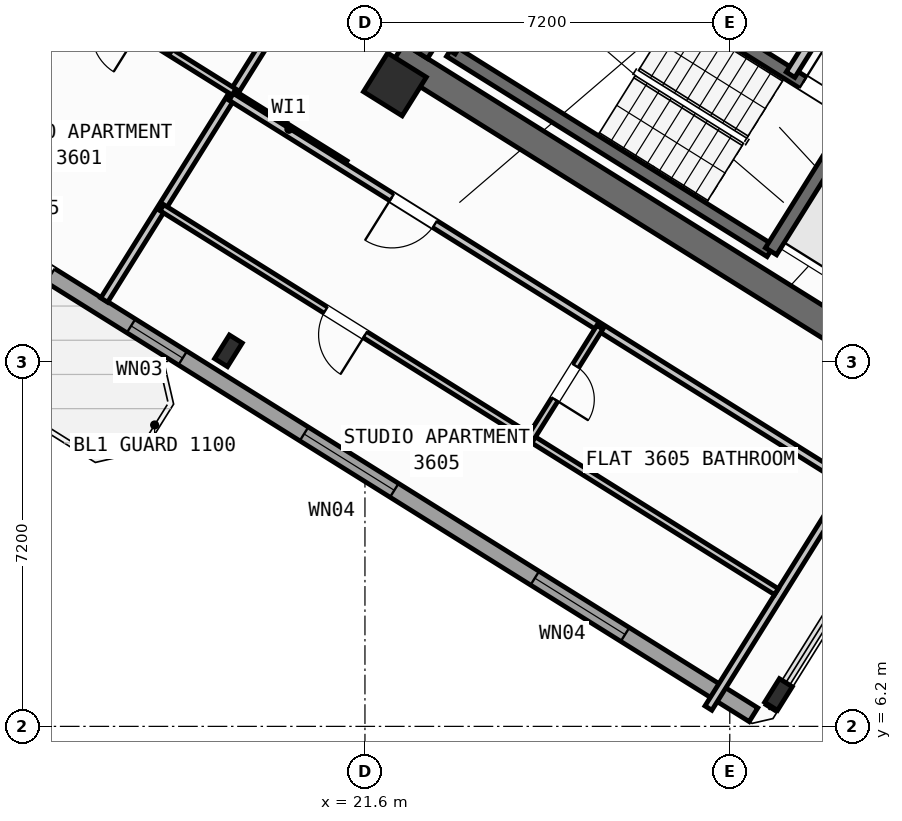
"""IFC4 building model, lengths in metres.
Left out: names, types, materials, properties, quantities, classifications, styles, units other than length and angle.
Written with IfcOpenShell. Run it as: python <this file> out.ifc"""

import sys

from ifc_helpers import new_model, si_unit, direction, frame, frame_2d, origin, origin_2d, place, context, subcontext, project, spatial, rectangle, hollow_rectangle, i_section, extrude, source, transform, mapped, element, fill, save


model = new_model("IFC4")
c1 = context("Model", 3, precision=1e-05, world=origin(), true_north=direction((0.0, 1.0)))
c2 = subcontext(c1, "Body", "Model", "MODEL_VIEW")
j1 = project(units=[si_unit("LENGTHUNIT", "METRE"), si_unit("PLANEANGLEUNIT", "RADIAN")], contexts=[c1])
p1 = place(None, origin())
s1 = spatial("IfcSite", under=j1, at=p1, CompositionType="ELEMENT")
p2 = place(p1, origin())
s2 = spatial("IfcBuilding", under=s1, at=p2, CompositionType="ELEMENT")
p3 = place(p2, frame((0.0, 0.0, 144.3)))
s3 = spatial("IfcBuildingStorey", under=s2, at=p3, CompositionType="ELEMENT", Elevation=144.3)
p4 = place(p3, frame((33.366, 12.477, 0.0), z_axis=(0.0, 0.0, 1.0), x_axis=(-0.848047359947, 0.529920442413, 0.0)))
e1 = element("IfcWall", 1, at=p4, inside=s3, PredefinedType="SHEAR", context=c2, shape_type="SweptSolid", body=[
    extrude(rectangle(XDim=13.14, YDim=0.55, at=frame_2d((6.57, 0.0))), origin(), (0.0, 0.0, 1.0), 3.35),
])
p5 = place(p3, frame((26.007, 24.976, 0.0), z_axis=(0.0, 0.0, 1.0), x_axis=(-0.529923795287, -0.848045264823, 0.0)))
e2 = element("IfcWall", 2, at=p5, inside=s3, PredefinedType="SHEAR", context=c2, shape_type="SweptSolid", body=[
    extrude(rectangle(XDim=6.425, YDim=0.55, at=frame_2d((3.212, 0.0))), origin(), (0.0, 0.0, 1.0), 3.35),
])
m1 = source(origin(), c2, "Body", "SweptSolid", [
    extrude(i_section(OverallWidth=0.3, OverallDepth=0.55, WebThickness=0.015, FlangeThickness=0.029, at=origin_2d()), origin(), (0.0, 0.0, 1.0), 3.6),
])
p6 = place(p3, frame((29.761, 6.829, 0.0), z_axis=(0.0, 0.0, 1.0), x_axis=(-0.848048096156, 0.529919264233, 0.0)))
e3 = element("IfcColumn", 3, at=p6, inside=s3, PredefinedType="COLUMN", context=c2, shape_type="MappedRepresentation", body=[
    mapped(m1, transform((0.0, 0.0, 0.0), scale=1.0)),
])
m2 = source(origin(), c2, "Body", "SweptSolid", [
    extrude(hollow_rectangle(XDim=0.9, YDim=0.9, WallThickness=0.036, at=origin_2d()), origin(), (0.0, 0.0, 1.0), 3.6),
])
p7 = place(p3, frame((22.191, 18.87, 0.0), z_axis=(0.0, 0.0, 1.0), x_axis=(-0.848048096156, 0.529919264233, 0.0)))
e4 = element("IfcColumn", 4, at=p7, inside=s3, PredefinedType="COLUMN", context=c2, shape_type="MappedRepresentation", body=[
    mapped(m2, transform((0.0, 0.0, 0.0), scale=1.0)),
])
p8 = place(p3, frame((18.906, 13.612, 0.0), z_axis=(0.0, 0.0, 1.0), x_axis=(-0.848048096156, 0.529919264233, 0.0)))
e5 = element("IfcColumn", 5, at=p8, inside=s3, PredefinedType="COLUMN", context=c2, shape_type="MappedRepresentation", body=[
    mapped(m1, transform((0.0, 0.0, 0.0), scale=1.0)),
])
p9 = place(p3, frame((29.268, 6.429, 0.0), z_axis=(0.0, 0.0, 1.0), x_axis=(-0.848049971435, 0.529916263149, 0.0)))
e6 = element("IfcWall", 6, at=p9, inside=s3, PredefinedType="STANDARD", context=c2, shape_type="SweptSolid", body=[
    extrude(rectangle(XDim=31.588, YDim=0.32, at=frame_2d((15.794, 0.0))), origin(), (0.0, 0.0, 1.0), 3.35),
])
p10 = place(p9, frame((16.362, 0.0, 0.0)))
e7 = element("IfcOpeningElement", 7, at=p10, cuts=e6, PredefinedType="OPENING", context=c2, shape_type="SweptSolid", body=[
    extrude(rectangle(XDim=1.2, YDim=2.15, at=frame_2d((0.6, 1.075))), frame((0.0, 0.17, 0.0), z_axis=(0.0, -1.0, 0.0), x_axis=(1.0, 0.0, 0.0)), (0.0, 0.0, 1.0), 0.34),
])
p11 = place(p9, frame((2.989, 0.0, 0.8)))
e8 = element("IfcOpeningElement", 8, at=p11, cuts=e6, PredefinedType="OPENING", context=c2, shape_type="SweptSolid", body=[
    extrude(rectangle(XDim=2.1, YDim=1.55, at=frame_2d((1.05, 0.775))), frame((0.0, 0.17, 0.0), z_axis=(0.0, -1.0, 0.0), x_axis=(1.0, 0.0, 0.0)), (0.0, 0.0, 1.0), 0.34),
])
p12 = place(p9, frame((8.359, 0.0, 0.8)))
e9 = element("IfcOpeningElement", 9, at=p12, cuts=e6, PredefinedType="OPENING", context=c2, shape_type="SweptSolid", body=[
    extrude(rectangle(XDim=2.1, YDim=1.55, at=frame_2d((1.05, 0.775))), frame((0.0, 0.17, 0.0), z_axis=(0.0, -1.0, 0.0), x_axis=(1.0, 0.0, 0.0)), (0.0, 0.0, 1.0), 0.34),
])
p13 = place(p9, frame((13.284, 0.0, 0.95)))
e10 = element("IfcOpeningElement", 10, at=p13, cuts=e6, PredefinedType="OPENING", context=c2, shape_type="SweptSolid", body=[
    extrude(rectangle(XDim=1.2, YDim=1.4, at=frame_2d((0.6, 0.7))), frame((0.0, 0.17, 0.0), z_axis=(0.0, -1.0, 0.0), x_axis=(1.0, 0.0, 0.0)), (0.0, 0.0, 1.0), 0.34),
])
p14 = place(p9, frame((29.188, 0.0, 0.95)))
e11 = element("IfcOpeningElement", 11, at=p14, cuts=e6, PredefinedType="OPENING", context=c2, shape_type="SweptSolid", body=[
    extrude(rectangle(XDim=1.2, YDim=1.4, at=frame_2d((0.6, 0.7))), frame((0.0, 0.17, 0.0), z_axis=(0.0, -1.0, 0.0), x_axis=(1.0, 0.0, 0.0)), (0.0, 0.0, 1.0), 0.34),
])
p15 = place(p9, frame((19.674, 0.0, 1.0)))
e12 = element("IfcOpeningElement", 12, at=p15, cuts=e6, PredefinedType="OPENING", context=c2, shape_type="SweptSolid", body=[
    extrude(rectangle(XDim=0.9, YDim=1.25, at=frame_2d((0.45, 0.625))), frame((0.0, 0.17, 0.0), z_axis=(0.0, -1.0, 0.0), x_axis=(1.0, 0.0, 0.0)), (0.0, 0.0, 1.0), 0.34),
])
p16 = place(p9, frame((21.896, 0.0, 1.0)))
e13 = element("IfcOpeningElement", 13, at=p16, cuts=e6, PredefinedType="OPENING", context=c2, shape_type="SweptSolid", body=[
    extrude(rectangle(XDim=0.9, YDim=1.25, at=frame_2d((0.45, 0.625))), frame((0.0, 0.17, 0.0), z_axis=(0.0, -1.0, 0.0), x_axis=(1.0, 0.0, 0.0)), (0.0, 0.0, 1.0), 0.34),
])
p17 = place(p9, frame((24.106, 0.0, 1.0)))
e14 = element("IfcOpeningElement", 14, at=p17, cuts=e6, PredefinedType="OPENING", context=c2, shape_type="SweptSolid", body=[
    extrude(rectangle(XDim=0.65, YDim=1.15, at=frame_2d((0.325, 0.575))), frame((0.0, 0.17, 0.0), z_axis=(0.0, -1.0, 0.0), x_axis=(1.0, 0.0, 0.0)), (0.0, 0.0, 1.0), 0.34),
])
p18 = place(p9, frame((26.366, 0.0, 1.0)))
e15 = element("IfcOpeningElement", 15, at=p18, cuts=e6, PredefinedType="OPENING", context=c2, shape_type="SweptSolid", body=[
    extrude(rectangle(XDim=0.9, YDim=1.25, at=frame_2d((0.45, 0.625))), frame((0.0, 0.17, 0.0), z_axis=(0.0, -1.0, 0.0), x_axis=(1.0, 0.0, 0.0)), (0.0, 0.0, 1.0), 0.34),
])
p19 = place(p3, frame((29.605, 15.581, 0.0), z_axis=(0.0, 0.0, 1.0), x_axis=(-0.848036911448, 0.529937163087, 0.0)))
e16 = element("IfcWall", 16, at=p19, inside=s3, PredefinedType="SHEAR", context=c2, shape_type="SweptSolid", body=[
    extrude(rectangle(XDim=7.46, YDim=0.26, at=frame_2d((3.73, 0.0))), origin(), (0.0, 0.0, 1.0), 3.35),
])
p20 = place(p3, frame((31.28, 18.261, 0.0), z_axis=(0.0, 0.0, 1.0), x_axis=(-0.848051618787, 0.529913626805, 0.0)))
e17 = element("IfcWall", 17, at=p20, inside=s3, PredefinedType="SHEAR", context=c2, shape_type="SweptSolid", body=[
    extrude(rectangle(XDim=7.46, YDim=0.26, at=frame_2d((3.73, 0.0))), origin(), (0.0, 0.0, 1.0), 3.35),
])
p21 = place(p20, frame((0.36, 0.0, 0.0)))
e18 = element("IfcOpeningElement", 18, at=p21, cuts=e17, PredefinedType="OPENING", context=c2, shape_type="SweptSolid", body=[
    extrude(rectangle(XDim=0.86, YDim=2.05, at=frame_2d((0.43, 1.025))), frame((0.0, 0.14, 0.0), z_axis=(0.0, -1.0, 0.0), x_axis=(1.0, 0.0, 0.0)), (0.0, 0.0, 1.0), 0.28),
])
p22 = place(p3, frame((31.288, 18.256, 0.0), z_axis=(0.0, 0.0, 1.0), x_axis=(-0.529943379326, -0.848033026897, 0.0)))
e19 = element("IfcWall", 19, at=p22, inside=s3, PredefinedType="SHEAR", context=c2, shape_type="SweptSolid", body=[
    extrude(rectangle(XDim=3.16, YDim=0.26, at=frame_2d((1.58, 0.0))), origin(), (0.0, 0.0, 1.0), 3.35),
])
p23 = place(p3, frame((24.945, 22.22, 0.0), z_axis=(0.0, 0.0, 1.0), x_axis=(-0.529908658664, -0.84805472316, 0.0)))
e20 = element("IfcWall", 20, at=p23, inside=s3, PredefinedType="SHEAR", context=c2, shape_type="SweptSolid", body=[
    extrude(rectangle(XDim=3.16, YDim=0.26, at=frame_2d((1.58, 0.0))), origin(), (0.0, 0.0, 1.0), 3.35),
])
p24 = place(p3, frame((31.525, 21.504, 0.0), z_axis=(0.0, 0.0, 1.0), x_axis=(-0.529907497854, -0.848055448493, 0.0)))
e21 = element("IfcWall", 21, at=p24, inside=s3, PredefinedType="STANDARD", context=c2, shape_type="SweptSolid", body=[
    extrude(rectangle(XDim=2.88, YDim=0.2, at=frame_2d((1.44, 0.0))), origin(), (0.0, 0.0, 1.0), 3.34),
])
p25 = place(p3, frame((21.206, 17.292, 0.0), z_axis=(0.0, 0.0, 1.0), x_axis=(-0.848050851465, 0.529914854792, 0.0)))
e22 = element("IfcWall", 22, at=p25, inside=s3, PredefinedType="PARTITIONING", context=c2, shape_type="SweptSolid", body=[
    extrude(rectangle(XDim=2.61, YDim=0.16, at=frame_2d((1.305, 0.0))), origin(), (0.0, 0.0, 1.0), 3.34),
])
p26 = place(p3, frame((21.938, 23.391, 0.0), z_axis=(0.0, 0.0, 1.0), x_axis=(-0.529924725692, -0.848044683434, 0.0)))
e23 = element("IfcWall", 23, at=p26, inside=s3, PredefinedType="PARTITIONING", context=c2, shape_type="SweptSolid", body=[
    extrude(rectangle(XDim=10.35, YDim=0.16, at=frame_2d((5.175, 0.0))), origin(), (0.0, 0.0, 1.0), 3.34),
])
p27 = place(p3, frame((16.519, 21.87, 0.0), z_axis=(0.0, 0.0, 1.0), x_axis=(-0.529922447305, -0.848046107144, 0.0)))
e24 = element("IfcWall", 24, at=p27, inside=s3, PredefinedType="PARTITIONING", context=c2, shape_type="SweptSolid", body=[
    extrude(rectangle(XDim=5.451, YDim=0.16, at=frame_2d((2.726, 0.0))), origin(), (0.0, 0.0, 1.0), 2.775),
])
p28 = place(p3, frame((19.019, 18.718, 0.0), z_axis=(0.0, 0.0, 1.0), x_axis=(-0.848059820872, 0.529900500304, 0.0)))
e25 = element("IfcWall", 25, at=p28, inside=s3, PredefinedType="PLUMBINGWALL", context=c2, shape_type="SweptSolid", body=[
    extrude(rectangle(XDim=3.79, YDim=0.14, at=frame_2d((1.895, 0.0))), origin(), (0.0, 0.0, 1.0), 3.34),
])
p29 = place(p28, frame((2.23, 0.0, 0.0)))
e26 = element("IfcOpeningElement", 26, at=p29, cuts=e25, PredefinedType="OPENING", context=c2, shape_type="SweptSolid", body=[
    extrude(rectangle(XDim=0.92, YDim=2.08, at=frame_2d((0.46, 1.04))), frame((0.0, 0.08, 0.0), z_axis=(0.0, -1.0, 0.0), x_axis=(1.0, 0.0, 0.0)), (0.0, 0.0, 1.0), 0.16),
])
p30 = place(p3, frame((20.624, 24.212, 0.0), z_axis=(0.0, 0.0, 1.0), x_axis=(-0.529919283494, -0.848048084121, 0.0)))
e27 = element("IfcWall", 27, at=p30, inside=s3, PredefinedType="PLUMBINGWALL", context=c2, shape_type="SweptSolid", body=[
    extrude(rectangle(XDim=5.51, YDim=0.14, at=frame_2d((2.755, 0.0))), origin(), (0.0, 0.0, 1.0), 2.995),
])
p31 = place(p30, frame((2.365, 0.0, 0.0)))
e28 = element("IfcOpeningElement", 28, at=p31, cuts=e27, PredefinedType="OPENING", context=c2, shape_type="SweptSolid", body=[
    extrude(rectangle(XDim=0.78, YDim=2.05, at=frame_2d((0.39, 1.025))), frame((0.0, 0.08, 0.0), z_axis=(0.0, -1.0, 0.0), x_axis=(1.0, 0.0, 0.0)), (0.0, 0.0, 1.0), 0.16),
])
p32 = place(p3, frame((32.164, 10.374, 0.0), z_axis=(0.0, 0.0, 1.0), x_axis=(-0.848044107957, 0.529925646633, 0.0)))
e29 = element("IfcWall", 29, at=p32, inside=s3, PredefinedType="PARTITIONING", context=c2, shape_type="SweptSolid", body=[
    extrude(rectangle(XDim=15.57, YDim=0.16, at=frame_2d((7.785, 0.0))), origin(), (0.0, 0.0, 1.0), 3.34),
])
p33 = place(p32, frame((10.83, 0.0, 0.0)))
e30 = element("IfcOpeningElement", 30, at=p33, cuts=e29, PredefinedType="OPENING", context=c2, shape_type="SweptSolid", body=[
    extrude(rectangle(XDim=1.0, YDim=2.1, at=frame_2d((0.5, 1.05))), frame((0.0, 0.09, 0.0), z_axis=(0.0, -1.0, 0.0), x_axis=(1.0, 0.0, 0.0)), (0.0, 0.0, 1.0), 0.18),
])
p34 = place(p3, frame((31.282, 11.208, 0.0), z_axis=(0.0, 0.0, 1.0), x_axis=(-0.529938869374, -0.84803584519, 0.0)))
e31 = element("IfcWall", 31, at=p34, inside=s3, PredefinedType="PARTITIONING", context=c2, shape_type="SweptSolid", body=[
    extrude(rectangle(XDim=5.48, YDim=0.16, at=frame_2d((2.74, 0.0))), origin(), (0.0, 0.0, 1.0), 3.34),
])
p35 = place(p3, frame((29.72, 8.859, 0.0), z_axis=(0.0, 0.0, 1.0), x_axis=(-0.848049134363, 0.529917602752, 0.0)))
e32 = element("IfcWall", 32, at=p35, inside=s3, PredefinedType="PLUMBINGWALL", context=c2, shape_type="SweptSolid", body=[
    extrude(rectangle(XDim=14.3, YDim=0.14, at=frame_2d((7.15, 0.0))), origin(), (0.0, 0.0, 1.0), 3.34),
])
p36 = place(p35, frame((9.57, 0.0, 0.0)))
e33 = element("IfcOpeningElement", 33, at=p36, cuts=e32, PredefinedType="OPENING", context=c2, shape_type="SweptSolid", body=[
    extrude(rectangle(XDim=0.92, YDim=2.08, at=frame_2d((0.46, 1.04))), frame((0.0, 0.08, 0.0), z_axis=(0.0, -1.0, 0.0), x_axis=(1.0, 0.0, 0.0)), (0.0, 0.0, 1.0), 0.16),
])
p37 = place(p3, frame((26.237, 14.078, 0.0), z_axis=(0.0, 0.0, 1.0), x_axis=(-0.52995640672, -0.848024885824, 0.0)))
e34 = element("IfcWall", 34, at=p37, inside=s3, PredefinedType="PLUMBINGWALL", context=c2, shape_type="SweptSolid", body=[
    extrude(rectangle(XDim=2.58, YDim=0.14, at=frame_2d((1.29, 0.0))), origin(), (0.0, 0.0, 1.0), 3.34),
])
p38 = place(p37, frame((0.9, 0.0, 0.0)))
e35 = element("IfcOpeningElement", 35, at=p38, cuts=e34, PredefinedType="OPENING", context=c2, shape_type="SweptSolid", body=[
    extrude(rectangle(XDim=0.78, YDim=2.05, at=frame_2d((0.39, 1.025))), frame((0.0, 0.08, 0.0), z_axis=(0.0, -1.0, 0.0), x_axis=(1.0, 0.0, 0.0)), (0.0, 0.0, 1.0), 0.16),
])
m3 = source(origin(), c2, "Body", "SweptSolid", [
    extrude(rectangle(XDim=2.1, YDim=1.55, at=frame_2d((1.05, 0.775))), frame((0.0, 0.03, 0.0), z_axis=(0.0, -1.0, 0.0), x_axis=(1.0, 0.0, 0.0)), (0.0, 0.0, 1.0), 0.06),
])
p39 = place(p11, origin())
e36 = element("IfcWindow", 36, at=p39, inside=s3, PartitioningType="SINGLE_PANEL", PredefinedType="WINDOW", context=c2, shape_type="MappedRepresentation", body=[
    mapped(m3, transform((0.0, 0.0, 0.0), scale=1.0)),
])
fill(e8, e36)
p40 = place(p12, origin())
e37 = element("IfcWindow", 37, at=p40, inside=s3, PartitioningType="SINGLE_PANEL", PredefinedType="WINDOW", context=c2, shape_type="MappedRepresentation", body=[
    mapped(m3, transform((0.0, 0.0, 0.0), scale=1.0)),
])
fill(e9, e37)
m4 = source(origin(), c2, "Body", "SweptSolid", [
    extrude(rectangle(XDim=1.2, YDim=1.4, at=frame_2d((0.6, 0.7))), frame((0.0, 0.03, 0.0), z_axis=(0.0, -1.0, 0.0), x_axis=(1.0, 0.0, 0.0)), (0.0, 0.0, 1.0), 0.06),
])
p41 = place(p13, origin())
e38 = element("IfcWindow", 38, at=p41, inside=s3, PartitioningType="SINGLE_PANEL", PredefinedType="WINDOW", context=c2, shape_type="MappedRepresentation", body=[
    mapped(m4, transform((0.0, 0.0, 0.0), scale=1.0)),
])
fill(e10, e38)
m5 = source(origin(), c2, "Body", "SweptSolid", [
    extrude(rectangle(XDim=0.86, YDim=2.05, at=frame_2d((0.43, 1.025))), frame((0.0, 0.025, 0.0), z_axis=(0.0, -1.0, 0.0), x_axis=(1.0, 0.0, 0.0)), (0.0, 0.0, 1.0), 0.05),
])
p42 = place(p21, frame((0.86, 0.0, 0.0), z_axis=(0.0, 0.0, 1.0), x_axis=(-1.0, 0.0, 0.0)))
e39 = element("IfcDoor", 39, at=p42, inside=s3, OperationType="SINGLE_SWING_LEFT", PredefinedType="DOOR", context=c2, shape_type="MappedRepresentation", body=[
    mapped(m5, transform((0.0, 0.0, 0.0), scale=1.0)),
])
fill(e18, e39)
m6 = source(origin(), c2, "Body", "SweptSolid", [
    extrude(rectangle(XDim=1.0, YDim=2.1, at=frame_2d((0.5, 1.05))), frame((0.0, 0.025, 0.0), z_axis=(0.0, -1.0, 0.0), x_axis=(1.0, 0.0, 0.0)), (0.0, 0.0, 1.0), 0.05),
])
p43 = place(p33, origin())
e40 = element("IfcDoor", 40, at=p43, inside=s3, OperationType="SINGLE_SWING_RIGHT", PredefinedType="DOOR", context=c2, shape_type="MappedRepresentation", body=[
    mapped(m6, transform((0.0, 0.0, 0.0), scale=1.0)),
])
fill(e30, e40)
m7 = source(origin(), c2, "Body", "SweptSolid", [
    extrude(rectangle(XDim=0.92, YDim=2.08, at=frame_2d((0.46, 1.04))), frame((0.0, 0.025, 0.0), z_axis=(0.0, -1.0, 0.0), x_axis=(1.0, 0.0, 0.0)), (0.0, 0.0, 1.0), 0.05),
])
p44 = place(p36, origin())
e41 = element("IfcDoor", 41, at=p44, inside=s3, OperationType="SINGLE_SWING_LEFT", PredefinedType="DOOR", context=c2, shape_type="MappedRepresentation", body=[
    mapped(m7, transform((0.0, 0.0, 0.0), scale=1.0)),
])
fill(e33, e41)
m8 = source(origin(), c2, "Body", "SweptSolid", [
    extrude(rectangle(XDim=0.78, YDim=2.05, at=frame_2d((0.39, 1.025))), frame((0.0, 0.025, 0.0), z_axis=(0.0, -1.0, 0.0), x_axis=(1.0, 0.0, 0.0)), (0.0, 0.0, 1.0), 0.05),
])
p45 = place(p38, origin())
e42 = element("IfcDoor", 42, at=p45, inside=s3, OperationType="SINGLE_SWING_RIGHT", PredefinedType="DOOR", context=c2, shape_type="MappedRepresentation", body=[
    mapped(m8, transform((0.0, 0.0, 0.0), scale=1.0)),
])
fill(e35, e42)
save(model, sys.argv[1])
